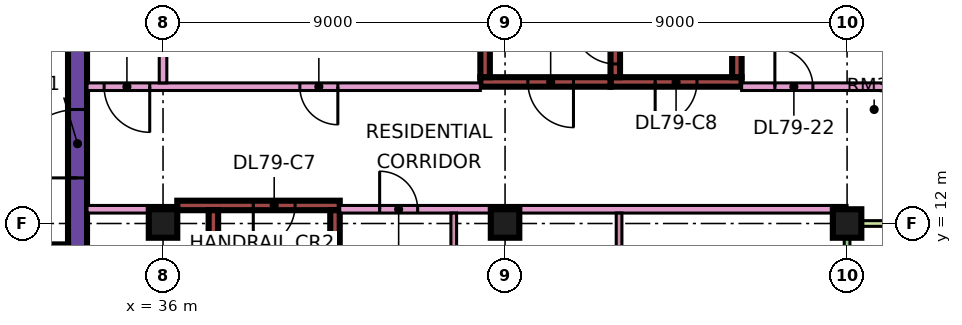
"""IFC4 building model, lengths in metres.
Left out: names, types, materials, properties, quantities, classifications, styles, units other than length and angle.
Written with IfcOpenShell. Run it as: python <this file> out.ifc"""

import sys

from ifc_helpers import new_model, si_unit, direction, frame, frame_2d, origin, origin_2d, place, context, subcontext, project, spatial, rectangle, extrude, element, fill, save


model = new_model("IFC4")
c1 = context("Model", 3, precision=1e-05, world=origin(), true_north=direction((0.0, 1.0)))
c2 = subcontext(c1, "Body", "Model", "MODEL_VIEW")
j1 = project(units=[si_unit("LENGTHUNIT", "METRE"), si_unit("PLANEANGLEUNIT", "RADIAN")], contexts=[c1])
p1 = place(None, origin())
s1 = spatial("IfcSite", under=j1, at=p1, CompositionType="ELEMENT")
p2 = place(p1, origin())
s2 = spatial("IfcBuilding", under=s1, at=p2, CompositionType="ELEMENT")
p3 = place(p2, frame((0.0, 0.0, 342.65)))
s3 = spatial("IfcBuildingStorey", under=s2, at=p3, CompositionType="ELEMENT", Elevation=342.65)
for number, where, z_axis, x_axis in (
    (1, (36.0, 12.0, 0.0), (0.0, 0.0, 1.0), (1.0, 0.0, 0.0)),
    (2, (45.0, 12.0, 0.0), (0.0, 0.0, 1.0), (1.0, 0.0, 0.0)),
    (3, (54.0, 12.0, 0.0), (0.0, 0.0, 1.0), (1.0, 0.0, 0.0)),
):
    element("IfcColumn", number, at=place(p3, frame(where, z_axis=z_axis, x_axis=x_axis)), inside=s3, PredefinedType="COLUMN", context=c2, shape_type="SweptSolid", body=[
        extrude(rectangle(XDim=0.75, YDim=0.75, at=origin_2d()), origin(), (0.0, 0.0, 1.0), 3.75),
    ])
p4 = place(p3, frame((33.75, 7.5, 0.0), z_axis=(0.0, 0.0, 1.0), x_axis=(0.0, 1.0, 0.0)))
e4 = element("IfcWall", 4, at=p4, inside=s3, PredefinedType="SHEAR", context=c2, shape_type="SweptSolid", body=[
    extrude(rectangle(XDim=12.0, YDim=0.5, at=frame_2d((6.0, 0.0))), origin(), (0.0, 0.0, 1.0), 3.75),
])
p5 = place(p4, frame((5.7, 0.0, 0.0)))
e5 = element("IfcOpeningElement", 5, at=p5, cuts=e4, PredefinedType="OPENING", context=c2, shape_type="SweptSolid", body=[
    extrude(rectangle(XDim=1.8, YDim=2.4, at=frame_2d((0.9, 1.2))), frame((0.0, 0.26, 0.0), z_axis=(0.0, -1.0, 0.0), x_axis=(1.0, 0.0, 0.0)), (0.0, 0.0, 1.0), 0.52),
])
p6 = place(p3, frame((36.375, 12.475, 0.0), z_axis=(0.0, 0.0, 1.0), x_axis=(1.0, 0.0, 0.0)))
e6 = element("IfcWall", 6, at=p6, inside=s3, PredefinedType="SHEAR", context=c2, shape_type="SweptSolid", body=[
    extrude(rectangle(XDim=4.275, YDim=0.25, at=frame_2d((2.137, 0.0))), origin(), (0.0, 0.0, 1.0), 3.75),
])
p7 = place(p6, frame((2.0, 0.0, 0.0)))
e7 = element("IfcOpeningElement", 7, at=p7, cuts=e6, PredefinedType="OPENING", context=c2, shape_type="SweptSolid", body=[
    extrude(rectangle(XDim=1.1, YDim=2.2, at=frame_2d((0.55, 1.1))), frame((0.0, 0.135, 0.0), z_axis=(0.0, -1.0, 0.0), x_axis=(1.0, 0.0, 0.0)), (0.0, 0.0, 1.0), 0.27),
])
for number, where, z_axis, x_axis in (
    (8, (37.325, 5.85, 0.0), (0.0, 0.0, 1.0), (0.0, 1.0, 0.0)),
    (9, (40.525, 5.85, 0.0), (0.0, 0.0, 1.0), (0.0, 1.0, 0.0)),
):
    element("IfcWall", number, at=place(p3, frame(where, z_axis=z_axis, x_axis=x_axis)), inside=s3, PredefinedType="SHEAR", context=c2, shape_type="SweptSolid", body=[
        extrude(rectangle(XDim=6.5, YDim=0.25, at=frame_2d((3.25, 0.0))), origin(), (0.0, 0.0, 1.0), 3.75),
    ])
p8 = place(p3, frame((47.775, 15.725, 0.0), z_axis=(0.0, 0.0, 1.0), x_axis=(1.0, 0.0, 0.0)))
e10 = element("IfcWall", 10, at=p8, inside=s3, PredefinedType="SHEAR", context=c2, shape_type="SweptSolid", body=[
    extrude(rectangle(XDim=3.45, YDim=0.25, at=frame_2d((1.725, 0.0))), origin(), (0.0, 0.0, 1.0), 3.75),
])
p9 = place(p8, frame((1.175, 0.0, 0.0)))
e11 = element("IfcOpeningElement", 11, at=p9, cuts=e10, PredefinedType="OPENING", context=c2, shape_type="SweptSolid", body=[
    extrude(rectangle(XDim=1.1, YDim=2.2, at=frame_2d((0.55, 1.1))), frame((0.0, 0.135, 0.0), z_axis=(0.0, -1.0, 0.0), x_axis=(1.0, 0.0, 0.0)), (0.0, 0.0, 1.0), 0.27),
])
p10 = place(p3, frame((47.9, 15.85, 0.0), z_axis=(0.0, 0.0, 1.0), x_axis=(0.0, 1.0, 0.0)))
e12 = element("IfcWall", 12, at=p10, inside=s3, PredefinedType="SHEAR", context=c2, shape_type="SweptSolid", body=[
    extrude(rectangle(XDim=6.5, YDim=0.25, at=frame_2d((3.25, 0.0))), origin(), (0.0, 0.0, 1.0), 3.75),
])
p11 = place(p10, frame((0.35, 0.0, 0.0)))
e13 = element("IfcOpeningElement", 13, at=p11, cuts=e12, PredefinedType="OPENING", context=c2, shape_type="SweptSolid", body=[
    extrude(rectangle(XDim=1.1, YDim=2.2, at=frame_2d((0.55, 1.1))), frame((0.0, 0.135, 0.0), z_axis=(0.0, -1.0, 0.0), x_axis=(1.0, 0.0, 0.0)), (0.0, 0.0, 1.0), 0.27),
])
p12 = place(p3, frame((51.1, 15.85, 0.0), z_axis=(0.0, 0.0, 1.0), x_axis=(0.0, 1.0, 0.0)))
e14 = element("IfcWall", 14, at=p12, inside=s3, PredefinedType="SHEAR", context=c2, shape_type="SweptSolid", body=[
    extrude(rectangle(XDim=6.5, YDim=0.25, at=frame_2d((3.25, 0.0))), origin(), (0.0, 0.0, 1.0), 3.75),
])
p13 = place(p3, frame((44.35, 15.725, 0.0), z_axis=(0.0, 0.0, 1.0), x_axis=(1.0, 0.0, 0.0)))
e15 = element("IfcWall", 15, at=p13, inside=s3, PredefinedType="SHEAR", context=c2, shape_type="SweptSolid", body=[
    extrude(rectangle(XDim=3.425, YDim=0.25, at=frame_2d((1.712, 0.0))), origin(), (0.0, 0.0, 1.0), 3.75),
])
p14 = place(p13, frame((1.25, 0.0, 0.0)))
e16 = element("IfcOpeningElement", 16, at=p14, cuts=e15, PredefinedType="OPENING", context=c2, shape_type="SweptSolid", body=[
    extrude(rectangle(XDim=1.2, YDim=2.2, at=frame_2d((0.6, 1.1))), frame((0.0, 0.135, 0.0), z_axis=(0.0, -1.0, 0.0), x_axis=(1.0, 0.0, 0.0)), (0.0, 0.0, 1.0), 0.27),
])
p15 = place(p3, frame((44.475, 15.85, 0.0), z_axis=(0.0, 0.0, 1.0), x_axis=(0.0, 1.0, 0.0)))
e17 = element("IfcWall", 17, at=p15, inside=s3, PredefinedType="SHEAR", context=c2, shape_type="SweptSolid", body=[
    extrude(rectangle(XDim=6.5, YDim=0.25, at=frame_2d((3.25, 0.0))), origin(), (0.0, 0.0, 1.0), 3.75),
])
p16 = place(p15, frame((1.75, 0.0, 0.0)))
e18 = element("IfcOpeningElement", 18, at=p16, cuts=e17, PredefinedType="OPENING", context=c2, shape_type="SweptSolid", body=[
    extrude(rectangle(XDim=1.1, YDim=2.2, at=frame_2d((0.55, 1.1))), frame((0.0, 0.135, 0.0), z_axis=(0.0, -1.0, 0.0), x_axis=(1.0, 0.0, 0.0)), (0.0, 0.0, 1.0), 0.27),
])
p17 = place(p15, frame((4.3, 0.0, 0.0)))
e19 = element("IfcOpeningElement", 19, at=p17, cuts=e17, PredefinedType="OPENING", context=c2, shape_type="SweptSolid", body=[
    extrude(rectangle(XDim=1.1, YDim=2.2, at=frame_2d((0.55, 1.1))), frame((0.0, 0.135, 0.0), z_axis=(0.0, -1.0, 0.0), x_axis=(1.0, 0.0, 0.0)), (0.0, 0.0, 1.0), 0.27),
])
p18 = place(p3, frame((54.0, 1.575, 0.0), z_axis=(0.0, 0.0, 1.0), x_axis=(0.0, 1.0, 0.0)))
e20 = element("IfcWall", 20, at=p18, inside=s3, PredefinedType="SOLIDWALL", context=c2, shape_type="SweptSolid", body=[
    extrude(rectangle(XDim=10.35, YDim=0.15, at=frame_2d((5.175, 0.0))), origin(), (0.0, 0.0, 1.0), 3.35),
])
p19 = place(p18, frame((0.663, 0.0, 0.0)))
e21 = element("IfcOpeningElement", 21, at=p19, cuts=e20, PredefinedType="OPENING", context=c2, shape_type="SweptSolid", body=[
    extrude(rectangle(XDim=1.8, YDim=2.4, at=frame_2d((0.9, 1.2))), frame((0.0, 0.085, 0.0), z_axis=(0.0, -1.0, 0.0), x_axis=(1.0, 0.0, 0.0)), (0.0, 0.0, 1.0), 0.17),
])
p20 = place(p18, frame((5.637, 0.0, 0.45)))
e22 = element("IfcOpeningElement", 22, at=p20, cuts=e20, PredefinedType="OPENING", context=c2, shape_type="SweptSolid", body=[
    extrude(rectangle(XDim=3.0, YDim=2.4, at=frame_2d((1.5, 1.2))), frame((0.0, 0.085, 0.0), z_axis=(0.0, -1.0, 0.0), x_axis=(1.0, 0.0, 0.0)), (0.0, 0.0, 1.0), 0.17),
])
p21 = place(p3, frame((55.5, 12.0, 0.0), z_axis=(0.0, 0.0, 1.0), x_axis=(-1.0, 0.0, 0.0)))
e23 = element("IfcWall", 23, at=p21, inside=s3, PredefinedType="SOLIDWALL", context=c2, shape_type="SweptSolid", body=[
    extrude(rectangle(XDim=1.5, YDim=0.15, at=frame_2d((0.75, 0.0))), origin(), (0.0, 0.0, 1.0), 3.35),
])
p22 = place(p3, frame((34.0, 12.375, 0.0), z_axis=(0.0, 0.0, 1.0), x_axis=(1.0, 0.0, 0.0)))
e24 = element("IfcWall", 24, at=p22, inside=s3, PredefinedType="PARTITIONING", context=c2, shape_type="SweptSolid", body=[
    extrude(rectangle(XDim=2.376, YDim=0.2, at=frame_2d((1.188, 0.0))), origin(), (0.0, 0.0, 1.0), 3.35),
])
p23 = place(p3, frame((34.0, 15.6, 0.0), z_axis=(0.0, 0.0, 1.0), x_axis=(1.0, 0.0, 0.0)))
e25 = element("IfcWall", 25, at=p23, inside=s3, PredefinedType="PARTITIONING", context=c2, shape_type="SweptSolid", body=[
    extrude(rectangle(XDim=10.35, YDim=0.2, at=frame_2d((5.175, 0.0))), origin(), (0.0, 0.0, 1.0), 3.35),
])
p24 = place(p23, frame((5.6, 0.0, 0.0)))
e26 = element("IfcOpeningElement", 26, at=p24, cuts=e25, PredefinedType="OPENING", context=c2, shape_type="SweptSolid", body=[
    extrude(rectangle(XDim=1.0, YDim=2.1, at=frame_2d((0.5, 1.05))), frame((0.0, 0.11, 0.0), z_axis=(0.0, -1.0, 0.0), x_axis=(1.0, 0.0, 0.0)), (0.0, 0.0, 1.0), 0.22),
])
p25 = place(p23, frame((0.45, 0.0, 0.0)))
e27 = element("IfcOpeningElement", 27, at=p25, cuts=e25, PredefinedType="OPENING", context=c2, shape_type="SweptSolid", body=[
    extrude(rectangle(XDim=1.2, YDim=2.1, at=frame_2d((0.6, 1.05))), frame((0.0, 0.11, 0.0), z_axis=(0.0, -1.0, 0.0), x_axis=(1.0, 0.0, 0.0)), (0.0, 0.0, 1.0), 0.22),
])
p26 = place(p3, frame((36.0, 15.7, 0.0), z_axis=(0.0, 0.0, 1.0), x_axis=(0.0, 1.0, 0.0)))
e28 = element("IfcWall", 28, at=p26, inside=s3, PredefinedType="PARTITIONING", context=c2, shape_type="SweptSolid", body=[
    extrude(rectangle(XDim=8.3, YDim=0.2, at=frame_2d((4.15, 0.0))), origin(), (0.0, 0.0, 1.0), 3.35),
])
p27 = place(p3, frame((40.65, 12.375, 0.0), z_axis=(0.0, 0.0, 1.0), x_axis=(1.0, 0.0, 0.0)))
e29 = element("IfcWall", 29, at=p27, inside=s3, PredefinedType="PARTITIONING", context=c2, shape_type="SweptSolid", body=[
    extrude(rectangle(XDim=13.35, YDim=0.2, at=frame_2d((6.675, 0.0))), origin(), (0.0, 0.0, 1.0), 3.35),
])
p28 = place(p27, frame((1.05, 0.0, 0.0)))
e30 = element("IfcOpeningElement", 30, at=p28, cuts=e29, PredefinedType="OPENING", context=c2, shape_type="SweptSolid", body=[
    extrude(rectangle(XDim=1.0, YDim=2.1, at=frame_2d((0.5, 1.05))), frame((0.0, 0.11, 0.0), z_axis=(0.0, -1.0, 0.0), x_axis=(1.0, 0.0, 0.0)), (0.0, 0.0, 1.0), 0.22),
])
p29 = place(p3, frame((43.65, 5.975, 0.0), z_axis=(0.0, 0.0, 1.0), x_axis=(0.0, 1.0, 0.0)))
e31 = element("IfcWall", 31, at=p29, inside=s3, PredefinedType="PARTITIONING", context=c2, shape_type="SweptSolid", body=[
    extrude(rectangle(XDim=6.3, YDim=0.15, at=frame_2d((3.15, 0.0))), origin(), (0.0, 0.0, 1.0), 3.35),
])
p30 = place(p29, frame((4.275, 0.0, 0.0)))
e32 = element("IfcOpeningElement", 32, at=p30, cuts=e31, PredefinedType="OPENING", context=c2, shape_type="SweptSolid", body=[
    extrude(rectangle(XDim=0.9, YDim=2.1, at=frame_2d((0.45, 1.05))), frame((0.0, 0.085, 0.0), z_axis=(0.0, -1.0, 0.0), x_axis=(1.0, 0.0, 0.0)), (0.0, 0.0, 1.0), 0.17),
])
p31 = place(p3, frame((48.0, 5.975, 0.0), z_axis=(0.0, 0.0, 1.0), x_axis=(0.0, 1.0, 0.0)))
e33 = element("IfcWall", 33, at=p31, inside=s3, PredefinedType="PARTITIONING", context=c2, shape_type="SweptSolid", body=[
    extrude(rectangle(XDim=6.3, YDim=0.15, at=frame_2d((3.15, 0.0))), origin(), (0.0, 0.0, 1.0), 3.35),
])
p32 = place(p3, frame((51.225, 15.6, 0.0), z_axis=(0.0, 0.0, 1.0), x_axis=(1.0, 0.0, 0.0)))
e34 = element("IfcWall", 34, at=p32, inside=s3, PredefinedType="PARTITIONING", context=c2, shape_type="SweptSolid", body=[
    extrude(rectangle(XDim=4.125, YDim=0.2, at=frame_2d((2.062, 0.0))), origin(), (0.0, 0.0, 1.0), 3.35),
])
p33 = place(p32, frame((0.875, 0.0, 0.0)))
e35 = element("IfcOpeningElement", 35, at=p33, cuts=e34, PredefinedType="OPENING", context=c2, shape_type="SweptSolid", body=[
    extrude(rectangle(XDim=1.0, YDim=2.1, at=frame_2d((0.5, 1.05))), frame((0.0, 0.11, 0.0), z_axis=(0.0, -1.0, 0.0), x_axis=(1.0, 0.0, 0.0)), (0.0, 0.0, 1.0), 0.22),
])
p34 = place(p5, origin())
e36 = element("IfcDoor", 36, at=p34, inside=s3, OperationType="DOUBLE_DOOR_SINGLE_SWING", PredefinedType="DOOR", context=c2, shape_type="SweptSolid", body=[
    extrude(rectangle(XDim=1.8, YDim=2.4, at=frame_2d((0.9, 1.2))), frame((0.0, 0.025, 0.0), z_axis=(0.0, -1.0, 0.0), x_axis=(1.0, 0.0, 0.0)), (0.0, 0.0, 1.0), 0.05),
])
fill(e5, e36)
p35 = place(p7, frame((1.1, 0.0, 0.0), z_axis=(0.0, 0.0, 1.0), x_axis=(-1.0, 0.0, 0.0)))
e37 = element("IfcDoor", 37, at=p35, inside=s3, OperationType="SINGLE_SWING_LEFT", PredefinedType="DOOR", context=c2, shape_type="SweptSolid", body=[
    extrude(rectangle(XDim=1.1, YDim=2.2, at=frame_2d((0.55, 1.1))), frame((0.0, 0.025, 0.0), z_axis=(0.0, -1.0, 0.0), x_axis=(1.0, 0.0, 0.0)), (0.0, 0.0, 1.0), 0.05),
])
fill(e7, e37)
p36 = place(p9, frame((1.1, 0.0, 0.0), z_axis=(0.0, 0.0, 1.0), x_axis=(-1.0, 0.0, 0.0)))
e38 = element("IfcDoor", 38, at=p36, inside=s3, OperationType="SINGLE_SWING_LEFT", PredefinedType="DOOR", context=c2, shape_type="SweptSolid", body=[
    extrude(rectangle(XDim=1.1, YDim=2.2, at=frame_2d((0.55, 1.1))), frame((0.0, 0.025, 0.0), z_axis=(0.0, -1.0, 0.0), x_axis=(1.0, 0.0, 0.0)), (0.0, 0.0, 1.0), 0.05),
])
fill(e11, e38)
p37 = place(p14, origin())
e39 = element("IfcDoor", 39, at=p37, inside=s3, OperationType="SINGLE_SWING_RIGHT", PredefinedType="DOOR", context=c2, shape_type="SweptSolid", body=[
    extrude(rectangle(XDim=1.2, YDim=2.2, at=frame_2d((0.6, 1.1))), frame((0.0, 0.025, 0.0), z_axis=(0.0, -1.0, 0.0), x_axis=(1.0, 0.0, 0.0)), (0.0, 0.0, 1.0), 0.05),
])
fill(e16, e39)
p38 = place(p11, frame((1.1, 0.0, 0.0), z_axis=(0.0, 0.0, 1.0), x_axis=(-1.0, 0.0, 0.0)))
e40 = element("IfcDoor", 40, at=p38, inside=s3, OperationType="SINGLE_SWING_RIGHT", PredefinedType="DOOR", context=c2, shape_type="SweptSolid", body=[
    extrude(rectangle(XDim=1.1, YDim=2.2, at=frame_2d((0.55, 1.1))), frame((0.0, 0.025, 0.0), z_axis=(0.0, -1.0, 0.0), x_axis=(1.0, 0.0, 0.0)), (0.0, 0.0, 1.0), 0.05),
])
fill(e13, e40)
p39 = place(p24, origin())
e41 = element("IfcDoor", 41, at=p39, inside=s3, OperationType="SINGLE_SWING_RIGHT", PredefinedType="DOOR", context=c2, shape_type="SweptSolid", body=[
    extrude(rectangle(XDim=1.0, YDim=2.1, at=frame_2d((0.5, 1.05))), frame((0.0, 0.025, 0.0), z_axis=(0.0, -1.0, 0.0), x_axis=(1.0, 0.0, 0.0)), (0.0, 0.0, 1.0), 0.05),
])
fill(e26, e41)
p40 = place(p25, origin())
e42 = element("IfcDoor", 42, at=p40, inside=s3, OperationType="SINGLE_SWING_RIGHT", PredefinedType="DOOR", context=c2, shape_type="SweptSolid", body=[
    extrude(rectangle(XDim=1.2, YDim=2.1, at=frame_2d((0.6, 1.05))), frame((0.0, 0.025, 0.0), z_axis=(0.0, -1.0, 0.0), x_axis=(1.0, 0.0, 0.0)), (0.0, 0.0, 1.0), 0.05),
])
fill(e27, e42)
p41 = place(p33, origin())
e43 = element("IfcDoor", 43, at=p41, inside=s3, OperationType="SINGLE_SWING_LEFT", PredefinedType="DOOR", context=c2, shape_type="SweptSolid", body=[
    extrude(rectangle(XDim=1.0, YDim=2.1, at=frame_2d((0.5, 1.05))), frame((0.0, 0.025, 0.0), z_axis=(0.0, -1.0, 0.0), x_axis=(1.0, 0.0, 0.0)), (0.0, 0.0, 1.0), 0.05),
])
fill(e35, e43)
p42 = place(p28, origin())
e44 = element("IfcDoor", 44, at=p42, inside=s3, OperationType="SINGLE_SWING_LEFT", PredefinedType="DOOR", context=c2, shape_type="SweptSolid", body=[
    extrude(rectangle(XDim=1.0, YDim=2.1, at=frame_2d((0.5, 1.05))), frame((0.0, 0.025, 0.0), z_axis=(0.0, -1.0, 0.0), x_axis=(1.0, 0.0, 0.0)), (0.0, 0.0, 1.0), 0.05),
])
fill(e30, e44)
save(model, sys.argv[1])
